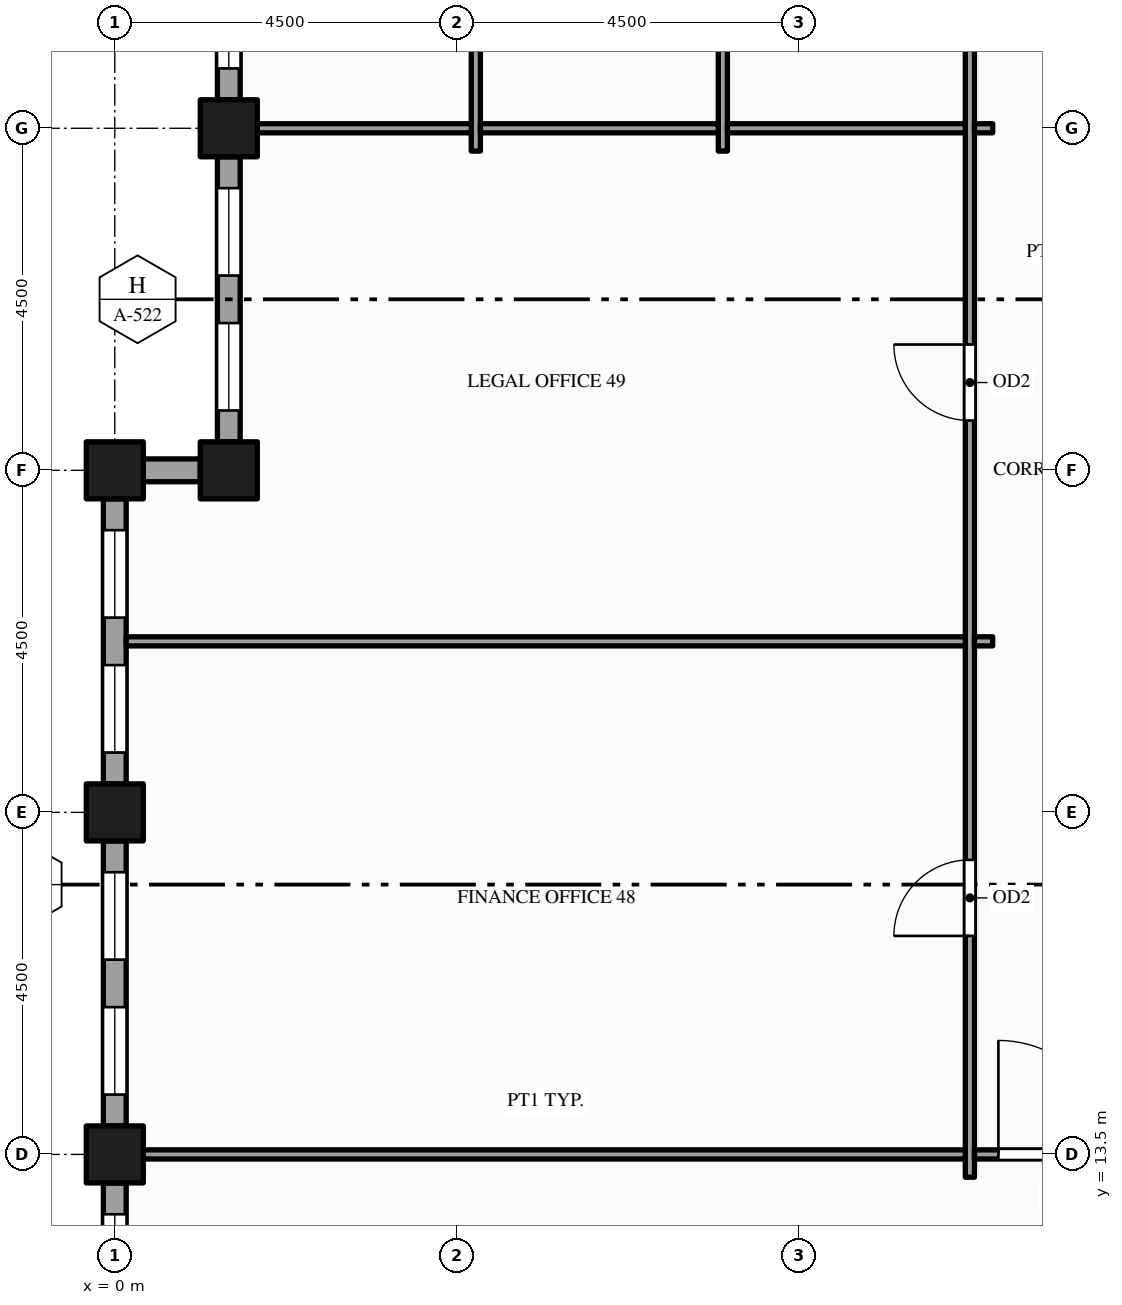
"""IFC4 building model, lengths in metres.
Left out: names, types, materials, properties, quantities, classifications, styles, units other than length and angle.
Written with IfcOpenShell. Run it as: python <this file> out.ifc"""

import sys

from ifc_helpers import new_model, si_unit, direction, frame, frame_2d, origin, origin_2d, place, context, subcontext, project, spatial, rectangle, hollow_rectangle, extrude, element, fill, save


model = new_model("IFC4")
c1 = context("Model", 3, precision=1e-05, world=origin(), true_north=direction((0.0, 1.0)))
c2 = subcontext(c1, "Body", "Model", "MODEL_VIEW")
j1 = project(units=[si_unit("LENGTHUNIT", "METRE"), si_unit("PLANEANGLEUNIT", "RADIAN")], contexts=[c1])
p1 = place(None, origin())
s1 = spatial("IfcSite", under=j1, at=p1, CompositionType="ELEMENT")
p2 = place(p1, origin())
s2 = spatial("IfcBuilding", under=s1, at=p2, CompositionType="ELEMENT")
p3 = place(p2, frame((0.0, 0.0, 207.0)))
s3 = spatial("IfcBuildingStorey", under=s2, at=p3, CompositionType="ELEMENT", Elevation=207.0)
for number, where, z_axis, x_axis in (
    (1, (0.0, 13.5, -0.15), (0.0, 0.0, 1.0), (1.0, 0.0, 0.0)),
    (2, (0.0, 18.0, -0.15), (0.0, 0.0, 1.0), (1.0, 0.0, 0.0)),
    (3, (0.0, 22.5, -0.15), (0.0, 0.0, 1.0), (1.0, 0.0, 0.0)),
    (4, (1.5, 22.5, -0.15), (0.0, 0.0, 1.0), (1.0, 0.0, 0.0)),
    (5, (1.5, 27.0, -0.15), (0.0, 0.0, 1.0), (1.0, 0.0, 0.0)),
):
    element("IfcColumn", number, at=place(p3, frame(where, z_axis=z_axis, x_axis=x_axis)), inside=s3, PredefinedType="COLUMN", context=c2, shape_type="SweptSolid", body=[
        extrude(hollow_rectangle(XDim=0.75, YDim=0.75, WallThickness=0.036, at=origin_2d()), origin(), (0.0, 0.0, 1.0), 4.0),
    ])
p4 = place(p3, frame((1.5, 31.125, 0.0), z_axis=(0.0, 0.0, 1.0), x_axis=(0.0, -1.0, 0.0)))
e6 = element("IfcWall", 6, at=p4, inside=s3, PredefinedType="STANDARD", context=c2, shape_type="SweptSolid", body=[
    extrude(rectangle(XDim=3.75, YDim=0.3, at=frame_2d((1.875, 0.0))), origin(), (0.0, 0.0, 1.0), 3.157),
])
p5 = place(p4, frame((0.413, 0.0, 0.9)))
e7 = element("IfcOpeningElement", 7, at=p5, cuts=e6, PredefinedType="OPENING", context=c2, shape_type="SweptSolid", body=[
    extrude(rectangle(XDim=1.15, YDim=2.0, at=frame_2d((0.575, 1.0))), frame((0.0, 0.16, 0.0), z_axis=(0.0, -1.0, 0.0), x_axis=(1.0, 0.0, 0.0)), (0.0, 0.0, 1.0), 0.32),
])
p6 = place(p4, frame((2.188, 0.0, 0.9)))
e8 = element("IfcOpeningElement", 8, at=p6, cuts=e6, PredefinedType="OPENING", context=c2, shape_type="SweptSolid", body=[
    extrude(rectangle(XDim=1.15, YDim=2.0, at=frame_2d((0.575, 1.0))), frame((0.0, 0.16, 0.0), z_axis=(0.0, -1.0, 0.0), x_axis=(1.0, 0.0, 0.0)), (0.0, 0.0, 1.0), 0.32),
])
p7 = place(p3, frame((1.5, 26.625, 0.0), z_axis=(0.0, 0.0, 1.0), x_axis=(0.0, -1.0, 0.0)))
e9 = element("IfcWall", 9, at=p7, inside=s3, PredefinedType="STANDARD", context=c2, shape_type="SweptSolid", body=[
    extrude(rectangle(XDim=3.75, YDim=0.3, at=frame_2d((1.875, 0.0))), origin(), (0.0, 0.0, 1.0), 3.157),
])
p8 = place(p7, frame((0.413, 0.0, 0.9)))
e10 = element("IfcOpeningElement", 10, at=p8, cuts=e9, PredefinedType="OPENING", context=c2, shape_type="SweptSolid", body=[
    extrude(rectangle(XDim=1.15, YDim=2.0, at=frame_2d((0.575, 1.0))), frame((0.0, 0.16, 0.0), z_axis=(0.0, -1.0, 0.0), x_axis=(1.0, 0.0, 0.0)), (0.0, 0.0, 1.0), 0.32),
])
p9 = place(p7, frame((2.188, 0.0, 0.9)))
e11 = element("IfcOpeningElement", 11, at=p9, cuts=e9, PredefinedType="OPENING", context=c2, shape_type="SweptSolid", body=[
    extrude(rectangle(XDim=1.15, YDim=2.0, at=frame_2d((0.575, 1.0))), frame((0.0, 0.16, 0.0), z_axis=(0.0, -1.0, 0.0), x_axis=(1.0, 0.0, 0.0)), (0.0, 0.0, 1.0), 0.32),
])
p10 = place(p3, frame((1.125, 22.5, 0.0), z_axis=(0.0, 0.0, 1.0), x_axis=(-1.0, 0.0, 0.0)))
e12 = element("IfcWall", 12, at=p10, inside=s3, PredefinedType="STANDARD", context=c2, shape_type="SweptSolid", body=[
    extrude(rectangle(XDim=0.75, YDim=0.3, at=frame_2d((0.375, 0.0))), origin(), (0.0, 0.0, 1.0), 3.157),
])
p11 = place(p3, frame((0.0, 22.125, 0.0), z_axis=(0.0, 0.0, 1.0), x_axis=(0.0, -1.0, 0.0)))
e13 = element("IfcWall", 13, at=p11, inside=s3, PredefinedType="STANDARD", context=c2, shape_type="SweptSolid", body=[
    extrude(rectangle(XDim=3.75, YDim=0.3, at=frame_2d((1.875, 0.0))), origin(), (0.0, 0.0, 1.0), 3.157),
])
p12 = place(p11, frame((0.413, 0.0, 0.9)))
e14 = element("IfcOpeningElement", 14, at=p12, cuts=e13, PredefinedType="OPENING", context=c2, shape_type="SweptSolid", body=[
    extrude(rectangle(XDim=1.15, YDim=2.0, at=frame_2d((0.575, 1.0))), frame((0.0, 0.16, 0.0), z_axis=(0.0, -1.0, 0.0), x_axis=(1.0, 0.0, 0.0)), (0.0, 0.0, 1.0), 0.32),
])
p13 = place(p11, frame((2.188, 0.0, 0.9)))
e15 = element("IfcOpeningElement", 15, at=p13, cuts=e13, PredefinedType="OPENING", context=c2, shape_type="SweptSolid", body=[
    extrude(rectangle(XDim=1.15, YDim=2.0, at=frame_2d((0.575, 1.0))), frame((0.0, 0.16, 0.0), z_axis=(0.0, -1.0, 0.0), x_axis=(1.0, 0.0, 0.0)), (0.0, 0.0, 1.0), 0.32),
])
p14 = place(p3, frame((0.0, 17.625, 0.0), z_axis=(0.0, 0.0, 1.0), x_axis=(0.0, -1.0, 0.0)))
e16 = element("IfcWall", 16, at=p14, inside=s3, PredefinedType="STANDARD", context=c2, shape_type="SweptSolid", body=[
    extrude(rectangle(XDim=3.75, YDim=0.3, at=frame_2d((1.875, 0.0))), origin(), (0.0, 0.0, 1.0), 3.157),
])
p15 = place(p14, frame((0.413, 0.0, 0.9)))
e17 = element("IfcOpeningElement", 17, at=p15, cuts=e16, PredefinedType="OPENING", context=c2, shape_type="SweptSolid", body=[
    extrude(rectangle(XDim=1.15, YDim=2.0, at=frame_2d((0.575, 1.0))), frame((0.0, 0.16, 0.0), z_axis=(0.0, -1.0, 0.0), x_axis=(1.0, 0.0, 0.0)), (0.0, 0.0, 1.0), 0.32),
])
p16 = place(p14, frame((2.188, 0.0, 0.9)))
e18 = element("IfcOpeningElement", 18, at=p16, cuts=e16, PredefinedType="OPENING", context=c2, shape_type="SweptSolid", body=[
    extrude(rectangle(XDim=1.15, YDim=2.0, at=frame_2d((0.575, 1.0))), frame((0.0, 0.16, 0.0), z_axis=(0.0, -1.0, 0.0), x_axis=(1.0, 0.0, 0.0)), (0.0, 0.0, 1.0), 0.32),
])
p17 = place(p3, frame((0.0, 13.125, 0.0), z_axis=(0.0, 0.0, 1.0), x_axis=(0.0, -1.0, 0.0)))
e19 = element("IfcWall", 19, at=p17, inside=s3, PredefinedType="STANDARD", context=c2, shape_type="SweptSolid", body=[
    extrude(rectangle(XDim=3.75, YDim=0.3, at=frame_2d((1.875, 0.0))), origin(), (0.0, 0.0, 1.0), 3.157),
])
p18 = place(p17, frame((0.413, 0.0, 0.9)))
e20 = element("IfcOpeningElement", 20, at=p18, cuts=e19, PredefinedType="OPENING", context=c2, shape_type="SweptSolid", body=[
    extrude(rectangle(XDim=1.15, YDim=2.0, at=frame_2d((0.575, 1.0))), frame((0.0, 0.16, 0.0), z_axis=(0.0, -1.0, 0.0), x_axis=(1.0, 0.0, 0.0)), (0.0, 0.0, 1.0), 0.32),
])
p19 = place(p17, frame((2.188, 0.0, 0.9)))
e21 = element("IfcOpeningElement", 21, at=p19, cuts=e19, PredefinedType="OPENING", context=c2, shape_type="SweptSolid", body=[
    extrude(rectangle(XDim=1.15, YDim=2.0, at=frame_2d((0.575, 1.0))), frame((0.0, 0.16, 0.0), z_axis=(0.0, -1.0, 0.0), x_axis=(1.0, 0.0, 0.0)), (0.0, 0.0, 1.0), 0.32),
])
for number, where, z_axis, x_axis in (
    (22, (4.75, 26.7, 0.0), (0.0, 0.0, 1.0), (0.0, 1.0, 0.0)),
    (23, (8.0, 26.7, 0.0), (0.0, 0.0, 1.0), (0.0, 1.0, 0.0)),
):
    element("IfcWall", number, at=place(p3, frame(where, z_axis=z_axis, x_axis=x_axis)), inside=s3, PredefinedType="PARTITIONING", context=c2, shape_type="SweptSolid", body=[
        extrude(rectangle(XDim=5.1, YDim=0.12, at=frame_2d((2.55, 0.0))), origin(), (0.0, 0.0, 1.0), 3.85),
    ])
p20 = place(p3, frame((11.25, 13.2, 0.0), z_axis=(0.0, 0.0, 1.0), x_axis=(0.0, 1.0, 0.0)))
e24 = element("IfcWall", 24, at=p20, inside=s3, PredefinedType="PARTITIONING", context=c2, shape_type="SweptSolid", body=[
    extrude(rectangle(XDim=18.6, YDim=0.12, at=frame_2d((9.3, 0.0))), origin(), (0.0, 0.0, 1.0), 2.6),
])
p21 = place(p20, frame((3.175, 0.0, 0.0)))
e25 = element("IfcOpeningElement", 25, at=p21, cuts=e24, PredefinedType="OPENING", context=c2, shape_type="SweptSolid", body=[
    extrude(rectangle(XDim=1.0, YDim=2.1, at=frame_2d((0.5, 1.05))), frame((0.0, 0.07, 0.0), z_axis=(0.0, -1.0, 0.0), x_axis=(1.0, 0.0, 0.0)), (0.0, 0.0, 1.0), 0.14),
])
p22 = place(p20, frame((9.955, 0.0, 0.0)))
e26 = element("IfcOpeningElement", 26, at=p22, cuts=e24, PredefinedType="OPENING", context=c2, shape_type="SweptSolid", body=[
    extrude(rectangle(XDim=1.0, YDim=2.1, at=frame_2d((0.5, 1.05))), frame((0.0, 0.07, 0.0), z_axis=(0.0, -1.0, 0.0), x_axis=(1.0, 0.0, 0.0)), (0.0, 0.0, 1.0), 0.14),
])
p23 = place(p3, frame((0.15, 13.5, 0.0), z_axis=(0.0, 0.0, 1.0), x_axis=(1.0, 0.0, 0.0)))
e27 = element("IfcWall", 27, at=p23, inside=s3, PredefinedType="PARTITIONING", context=c2, shape_type="SweptSolid", body=[
    extrude(rectangle(XDim=11.04, YDim=0.12, at=frame_2d((5.52, 0.0))), origin(), (0.0, 0.0, 1.0), 2.87),
])
p24 = place(p3, frame((11.31, 13.5, 0.0), z_axis=(0.0, 0.0, 1.0), x_axis=(1.0, 0.0, 0.0)))
e28 = element("IfcWall", 28, at=p24, inside=s3, PredefinedType="PARTITIONING", context=c2, shape_type="SweptSolid", body=[
    extrude(rectangle(XDim=2.13, YDim=0.12, at=frame_2d((1.065, 0.0))), origin(), (0.0, 0.0, 1.0), 2.87),
])
p25 = place(p24, frame((0.315, 0.0, 0.0)))
e29 = element("IfcOpeningElement", 29, at=p25, cuts=e28, PredefinedType="OPENING", context=c2, shape_type="SweptSolid", body=[
    extrude(rectangle(XDim=1.5, YDim=2.1, at=frame_2d((0.75, 1.05))), frame((0.0, 0.07, 0.0), z_axis=(0.0, -1.0, 0.0), x_axis=(1.0, 0.0, 0.0)), (0.0, 0.0, 1.0), 0.14),
])
p26 = place(p3, frame((0.15, 20.25, 0.0), z_axis=(0.0, 0.0, 1.0), x_axis=(1.0, 0.0, 0.0)))
e30 = element("IfcWall", 30, at=p26, inside=s3, PredefinedType="PARTITIONING", context=c2, shape_type="SweptSolid", body=[
    extrude(rectangle(XDim=11.04, YDim=0.12, at=frame_2d((5.52, 0.0))), origin(), (0.0, 0.0, 1.0), 2.87),
])
p27 = place(p3, frame((11.31, 20.25, 0.0), z_axis=(0.0, 0.0, 1.0), x_axis=(1.0, 0.0, 0.0)))
e31 = element("IfcWall", 31, at=p27, inside=s3, PredefinedType="PARTITIONING", context=c2, shape_type="SweptSolid", body=[
    extrude(rectangle(XDim=0.24, YDim=0.12, at=frame_2d((0.12, 0.0))), origin(), (0.0, 0.0, 1.0), 2.87),
])
p28 = place(p3, frame((1.65, 27.0, 0.0), z_axis=(0.0, 0.0, 1.0), x_axis=(1.0, 0.0, 0.0)))
e32 = element("IfcWall", 32, at=p28, inside=s3, PredefinedType="PARTITIONING", context=c2, shape_type="SweptSolid", body=[
    extrude(rectangle(XDim=3.04, YDim=0.12, at=frame_2d((1.52, 0.0))), origin(), (0.0, 0.0, 1.0), 2.87),
])
for number, where, z_axis, x_axis in (
    (33, (4.81, 27.0, 0.0), (0.0, 0.0, 1.0), (1.0, 0.0, 0.0)),
    (34, (8.06, 27.0, 0.0), (0.0, 0.0, 1.0), (1.0, 0.0, 0.0)),
):
    element("IfcWall", number, at=place(p3, frame(where, z_axis=z_axis, x_axis=x_axis)), inside=s3, PredefinedType="PARTITIONING", context=c2, shape_type="SweptSolid", body=[
        extrude(rectangle(XDim=3.13, YDim=0.12, at=frame_2d((1.565, 0.0))), origin(), (0.0, 0.0, 1.0), 2.87),
    ])
p29 = place(p3, frame((11.31, 27.0, 0.0), z_axis=(0.0, 0.0, 1.0), x_axis=(1.0, 0.0, 0.0)))
e35 = element("IfcWall", 35, at=p29, inside=s3, PredefinedType="PARTITIONING", context=c2, shape_type="SweptSolid", body=[
    extrude(rectangle(XDim=0.24, YDim=0.12, at=frame_2d((0.12, 0.0))), origin(), (0.0, 0.0, 1.0), 2.87),
])
p30 = place(p6, origin())
e36 = element("IfcWindow", 36, at=p30, inside=s3, PartitioningType="SINGLE_PANEL", PredefinedType="WINDOW", context=c2, shape_type="SweptSolid", body=[
    extrude(rectangle(XDim=1.15, YDim=2.0, at=frame_2d((0.575, 1.0))), frame((0.0, 0.03, 0.0), z_axis=(0.0, -1.0, 0.0), x_axis=(1.0, 0.0, 0.0)), (0.0, 0.0, 1.0), 0.06),
])
fill(e8, e36)
p31 = place(p8, origin())
e37 = element("IfcWindow", 37, at=p31, inside=s3, PartitioningType="SINGLE_PANEL", PredefinedType="WINDOW", context=c2, shape_type="SweptSolid", body=[
    extrude(rectangle(XDim=1.15, YDim=2.0, at=frame_2d((0.575, 1.0))), frame((0.0, 0.03, 0.0), z_axis=(0.0, -1.0, 0.0), x_axis=(1.0, 0.0, 0.0)), (0.0, 0.0, 1.0), 0.06),
])
fill(e10, e37)
p32 = place(p9, origin())
e38 = element("IfcWindow", 38, at=p32, inside=s3, PartitioningType="SINGLE_PANEL", PredefinedType="WINDOW", context=c2, shape_type="SweptSolid", body=[
    extrude(rectangle(XDim=1.15, YDim=2.0, at=frame_2d((0.575, 1.0))), frame((0.0, 0.03, 0.0), z_axis=(0.0, -1.0, 0.0), x_axis=(1.0, 0.0, 0.0)), (0.0, 0.0, 1.0), 0.06),
])
fill(e11, e38)
p33 = place(p12, origin())
e39 = element("IfcWindow", 39, at=p33, inside=s3, PartitioningType="SINGLE_PANEL", PredefinedType="WINDOW", context=c2, shape_type="SweptSolid", body=[
    extrude(rectangle(XDim=1.15, YDim=2.0, at=frame_2d((0.575, 1.0))), frame((0.0, 0.03, 0.0), z_axis=(0.0, -1.0, 0.0), x_axis=(1.0, 0.0, 0.0)), (0.0, 0.0, 1.0), 0.06),
])
fill(e14, e39)
p34 = place(p13, origin())
e40 = element("IfcWindow", 40, at=p34, inside=s3, PartitioningType="SINGLE_PANEL", PredefinedType="WINDOW", context=c2, shape_type="SweptSolid", body=[
    extrude(rectangle(XDim=1.15, YDim=2.0, at=frame_2d((0.575, 1.0))), frame((0.0, 0.03, 0.0), z_axis=(0.0, -1.0, 0.0), x_axis=(1.0, 0.0, 0.0)), (0.0, 0.0, 1.0), 0.06),
])
fill(e15, e40)
p35 = place(p15, origin())
e41 = element("IfcWindow", 41, at=p35, inside=s3, PartitioningType="SINGLE_PANEL", PredefinedType="WINDOW", context=c2, shape_type="SweptSolid", body=[
    extrude(rectangle(XDim=1.15, YDim=2.0, at=frame_2d((0.575, 1.0))), frame((0.0, 0.03, 0.0), z_axis=(0.0, -1.0, 0.0), x_axis=(1.0, 0.0, 0.0)), (0.0, 0.0, 1.0), 0.06),
])
fill(e17, e41)
p36 = place(p16, origin())
e42 = element("IfcWindow", 42, at=p36, inside=s3, PartitioningType="SINGLE_PANEL", PredefinedType="WINDOW", context=c2, shape_type="SweptSolid", body=[
    extrude(rectangle(XDim=1.15, YDim=2.0, at=frame_2d((0.575, 1.0))), frame((0.0, 0.03, 0.0), z_axis=(0.0, -1.0, 0.0), x_axis=(1.0, 0.0, 0.0)), (0.0, 0.0, 1.0), 0.06),
])
fill(e18, e42)
p37 = place(p18, origin())
e43 = element("IfcWindow", 43, at=p37, inside=s3, PartitioningType="SINGLE_PANEL", PredefinedType="WINDOW", context=c2, shape_type="SweptSolid", body=[
    extrude(rectangle(XDim=1.15, YDim=2.0, at=frame_2d((0.575, 1.0))), frame((0.0, 0.03, 0.0), z_axis=(0.0, -1.0, 0.0), x_axis=(1.0, 0.0, 0.0)), (0.0, 0.0, 1.0), 0.06),
])
fill(e20, e43)
p38 = place(p25, origin())
e44 = element("IfcDoor", 44, at=p38, inside=s3, OperationType="SINGLE_SWING_LEFT", PredefinedType="DOOR", context=c2, shape_type="SweptSolid", body=[
    extrude(rectangle(XDim=1.5, YDim=2.1, at=frame_2d((0.75, 1.05))), frame((0.0, 0.025, 0.0), z_axis=(0.0, -1.0, 0.0), x_axis=(1.0, 0.0, 0.0)), (0.0, 0.0, 1.0), 0.05),
])
fill(e29, e44)
p39 = place(p21, origin())
e45 = element("IfcDoor", 45, at=p39, inside=s3, OperationType="SINGLE_SWING_LEFT", PredefinedType="DOOR", context=c2, shape_type="SweptSolid", body=[
    extrude(rectangle(XDim=1.0, YDim=2.1, at=frame_2d((0.5, 1.05))), frame((0.0, 0.025, 0.0), z_axis=(0.0, -1.0, 0.0), x_axis=(1.0, 0.0, 0.0)), (0.0, 0.0, 1.0), 0.05),
])
fill(e25, e45)
p40 = place(p22, origin())
e46 = element("IfcDoor", 46, at=p40, inside=s3, OperationType="SINGLE_SWING_RIGHT", PredefinedType="DOOR", context=c2, shape_type="SweptSolid", body=[
    extrude(rectangle(XDim=1.0, YDim=2.1, at=frame_2d((0.5, 1.05))), frame((0.0, 0.025, 0.0), z_axis=(0.0, -1.0, 0.0), x_axis=(1.0, 0.0, 0.0)), (0.0, 0.0, 1.0), 0.05),
])
fill(e26, e46)
save(model, sys.argv[1])
